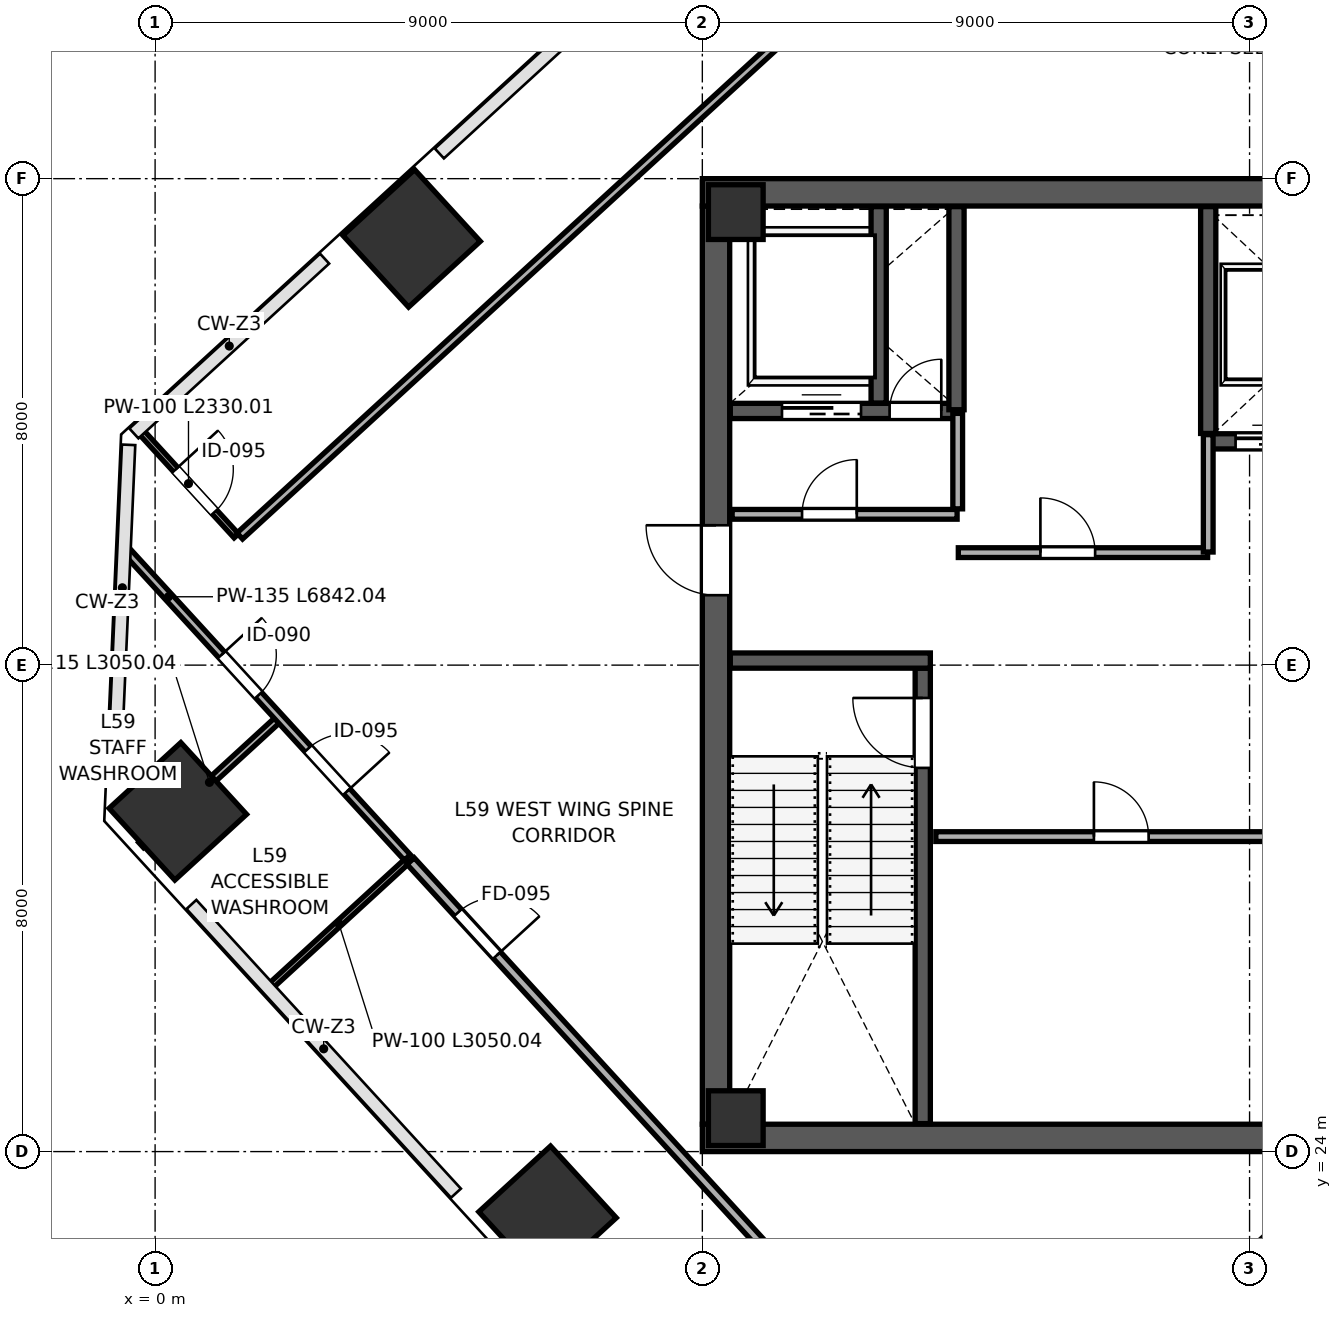
"""IFC4 building model, lengths in metres.
Left out: names, types, materials, properties, quantities, classifications, styles, units other than length and angle.
Written with IfcOpenShell. Run it as: python <this file> out.ifc"""

import sys

from ifc_helpers import new_model, si_unit, direction, frame, frame_2d, origin, origin_2d, place, context, subcontext, project, spatial, rectangle, extrude, source, transform, mapped, element, fill, save


model = new_model("IFC4")
c1 = context("Model", 3, precision=1e-05, world=origin(), true_north=direction((0.0, 1.0)))
c2 = subcontext(c1, "Body", "Model", "MODEL_VIEW")
j1 = project(units=[si_unit("LENGTHUNIT", "METRE"), si_unit("PLANEANGLEUNIT", "RADIAN")], contexts=[c1])
p1 = place(None, origin())
s1 = spatial("IfcSite", under=j1, at=p1, CompositionType="ELEMENT")
p2 = place(p1, origin())
s2 = spatial("IfcBuilding", under=s1, at=p2, CompositionType="ELEMENT")
p3 = place(p2, frame((0.0, 0.0, 262.6)))
s3 = spatial("IfcBuildingStorey", under=s2, at=p3, CompositionType="ELEMENT", Elevation=262.6)
m1 = source(origin(), c2, "Body", "SweptSolid", [
    extrude(rectangle(XDim=0.9, YDim=0.9, at=origin_2d()), origin(), (0.0, 0.0, 1.0), 4.198),
])
for number, where, z_axis, x_axis in (
    (1, (9.55, 24.55, 0.001), (0.0, 0.0, 1.0), (1.0, 0.0, 0.0)),
    (2, (9.55, 39.45, 0.001), (0.0, 0.0, 1.0), (1.0, 0.0, 0.0)),
):
    element("IfcColumn", number, at=place(p3, frame(where, z_axis=z_axis, x_axis=x_axis)), inside=s3, PredefinedType="COLUMN", context=c2, shape_type="MappedRepresentation", body=[
        mapped(m1, transform((0.0, 0.0, 0.0), scale=1.0)),
    ])
m2 = source(origin(), c2, "Body", "SweptSolid", [
    extrude(rectangle(XDim=1.6, YDim=1.6, at=origin_2d()), origin(), (0.0, 0.0, 1.0), 4.198),
])
for number, where, z_axis, x_axis in (
    (3, (0.374, 29.596, 0.001), (0.0, 0.0, 1.0), (-0.676, 0.737, 0.0)),
    (4, (6.454, 22.96, 0.001), (0.0, 0.0, 1.0), (-0.676, 0.737, 0.0)),
    (5, (4.218, 39.018, 0.001), (0.0, 0.0, 1.0), (-0.676, 0.737, 0.0)),
):
    element("IfcColumn", number, at=place(p3, frame(where, z_axis=z_axis, x_axis=x_axis)), inside=s3, PredefinedType="COLUMN", context=c2, shape_type="MappedRepresentation", body=[
        mapped(m2, transform((0.0, 0.0, 0.0), scale=1.0)),
    ])
p4 = place(p3, frame((9.225, 24.45, 0.0), z_axis=(0.0, 0.0, 1.0), x_axis=(0.0, 1.0, 0.0)))
e6 = element("IfcWall", 6, at=p4, inside=s3, PredefinedType="SHEAR", context=c2, shape_type="SweptSolid", body=[
    extrude(rectangle(XDim=15.1, YDim=0.45, at=frame_2d((7.55, 0.0))), origin(), (0.0, 0.0, 1.0), 3.96),
])
p5 = place(p4, frame((8.7, 0.0, 0.0)))
e7 = element("IfcOpeningElement", 7, at=p5, cuts=e6, PredefinedType="OPENING", context=c2, shape_type="SweptSolid", body=[
    extrude(rectangle(XDim=1.15, YDim=2.2, at=frame_2d((0.575, 1.1))), frame((0.0, 0.235, 0.0), z_axis=(0.0, -1.0, 0.0), x_axis=(1.0, 0.0, 0.0)), (0.0, 0.0, 1.0), 0.47),
])
for number, where, z_axis, x_axis in (
    (8, (9.0, 24.225, 0.0), (0.0, 0.0, 1.0), (1.0, 0.0, 0.0)),
    (9, (9.0, 39.775, 0.0), (0.0, 0.0, 1.0), (1.0, 0.0, 0.0)),
):
    element("IfcWall", number, at=place(p3, frame(where, z_axis=z_axis, x_axis=x_axis)), inside=s3, PredefinedType="SHEAR", context=c2, shape_type="SweptSolid", body=[
        extrude(rectangle(XDim=18.0, YDim=0.45, at=frame_2d((9.0, 0.0))), origin(), (0.0, 0.0, 1.0), 3.96),
    ])
p6 = place(p3, frame((12.625, 24.46, 0.0), z_axis=(0.0, 0.0, 1.0), x_axis=(0.0, 1.0, 0.0)))
e10 = element("IfcWall", 10, at=p6, inside=s3, PredefinedType="SHEAR", context=c2, shape_type="SweptSolid", body=[
    extrude(rectangle(XDim=7.49, YDim=0.25, at=frame_2d((3.745, 0.0))), origin(), (0.0, 0.0, 1.0), 3.96),
])
p7 = place(p6, frame((5.85, 0.0, 0.0)))
e11 = element("IfcOpeningElement", 11, at=p7, cuts=e10, PredefinedType="OPENING", context=c2, shape_type="SweptSolid", body=[
    extrude(rectangle(XDim=1.15, YDim=2.2, at=frame_2d((0.575, 1.1))), frame((0.0, 0.135, 0.0), z_axis=(0.0, -1.0, 0.0), x_axis=(1.0, 0.0, 0.0)), (0.0, 0.0, 1.0), 0.27),
])
p8 = place(p3, frame((9.46, 32.075, 0.0), z_axis=(0.0, 0.0, 1.0), x_axis=(1.0, 0.0, 0.0)))
e12 = element("IfcWall", 12, at=p8, inside=s3, PredefinedType="SHEAR", context=c2, shape_type="SweptSolid", body=[
    extrude(rectangle(XDim=3.29, YDim=0.25, at=frame_2d((1.645, 0.0))), origin(), (0.0, 0.0, 1.0), 3.96),
])
p9 = place(p3, frame((9.46, 36.18, 0.0), z_axis=(0.0, 0.0, 1.0), x_axis=(1.0, 0.0, 0.0)))
e13 = element("IfcWall", 13, at=p9, inside=s3, PredefinedType="SHEAR", context=c2, shape_type="SweptSolid", body=[
    extrude(rectangle(XDim=3.79, YDim=0.25, at=frame_2d((1.895, 0.0))), origin(), (0.0, 0.0, 1.0), 3.96),
])
p10 = place(p9, frame((2.62, 0.0, 0.0)))
e14 = element("IfcOpeningElement", 14, at=p10, cuts=e13, PredefinedType="OPENING", context=c2, shape_type="SweptSolid", body=[
    extrude(rectangle(XDim=0.85, YDim=2.1, at=frame_2d((0.425, 1.05))), frame((0.0, 0.135, 0.0), z_axis=(0.0, -1.0, 0.0), x_axis=(1.0, 0.0, 0.0)), (0.0, 0.0, 1.0), 0.27),
])
p11 = place(p9, frame((0.85, 0.0, 0.0)))
e15 = element("IfcOpeningElement", 15, at=p11, cuts=e13, PredefinedType="OPENING", context=c2, shape_type="SweptSolid", body=[
    extrude(rectangle(XDim=1.3, YDim=2.25, at=frame_2d((0.65, 1.125))), frame((0.0, 0.135, 0.0), z_axis=(0.0, -1.0, 0.0), x_axis=(1.0, 0.0, 0.0)), (0.0, 0.0, 1.0), 0.27),
])
p12 = place(p3, frame((11.9, 36.31, 0.0), z_axis=(0.0, 0.0, 1.0), x_axis=(0.0, 1.0, 0.0)))
e16 = element("IfcWall", 16, at=p12, inside=s3, PredefinedType="SHEAR", context=c2, shape_type="SweptSolid", body=[
    extrude(rectangle(XDim=3.23, YDim=0.25, at=frame_2d((1.615, 0.0))), origin(), (0.0, 0.0, 1.0), 3.96),
])
p13 = place(p3, frame((13.18, 36.2, 0.0), z_axis=(0.0, 0.0, 1.0), x_axis=(0.0, 1.0, 0.0)))
e17 = element("IfcWall", 17, at=p13, inside=s3, PredefinedType="SHEAR", context=c2, shape_type="SweptSolid", body=[
    extrude(rectangle(XDim=3.34, YDim=0.25, at=frame_2d((1.67, 0.0))), origin(), (0.0, 0.0, 1.0), 3.96),
])
p14 = place(p3, frame((17.32, 35.68, 0.0), z_axis=(0.0, 0.0, 1.0), x_axis=(1.0, 0.0, 0.0)))
e18 = element("IfcWall", 18, at=p14, inside=s3, PredefinedType="SHEAR", context=c2, shape_type="SweptSolid", body=[
    extrude(rectangle(XDim=3.87, YDim=0.25, at=frame_2d((1.935, 0.0))), origin(), (0.0, 0.0, 1.0), 3.96),
])
p15 = place(p14, frame((0.45, 0.0, 0.0)))
e19 = element("IfcOpeningElement", 19, at=p15, cuts=e18, PredefinedType="OPENING", context=c2, shape_type="SweptSolid", body=[
    extrude(rectangle(XDim=1.1, YDim=2.2, at=frame_2d((0.55, 1.1))), frame((0.0, 0.135, 0.0), z_axis=(0.0, -1.0, 0.0), x_axis=(1.0, 0.0, 0.0)), (0.0, 0.0, 1.0), 0.27),
])
p16 = place(p14, frame((2.35, 0.0, 0.0)))
e20 = element("IfcOpeningElement", 20, at=p16, cuts=e18, PredefinedType="OPENING", context=c2, shape_type="SweptSolid", body=[
    extrude(rectangle(XDim=1.1, YDim=2.2, at=frame_2d((0.55, 1.1))), frame((0.0, 0.135, 0.0), z_axis=(0.0, -1.0, 0.0), x_axis=(1.0, 0.0, 0.0)), (0.0, 0.0, 1.0), 0.27),
])
p17 = place(p3, frame((17.32, 35.81, 0.0), z_axis=(0.0, 0.0, 1.0), x_axis=(0.0, 1.0, 0.0)))
e21 = element("IfcWall", 21, at=p17, inside=s3, PredefinedType="SHEAR", context=c2, shape_type="SweptSolid", body=[
    extrude(rectangle(XDim=3.73, YDim=0.25, at=frame_2d((1.865, 0.0))), origin(), (0.0, 0.0, 1.0), 3.96),
])
p18 = place(p3, frame((9.49, 34.48, 0.0), z_axis=(0.0, 0.0, 1.0), x_axis=(1.0, 0.0, 0.0)))
e22 = element("IfcWall", 22, at=p18, inside=s3, PredefinedType="PARTITIONING", context=c2, shape_type="SweptSolid", body=[
    extrude(rectangle(XDim=3.7, YDim=0.16, at=frame_2d((1.85, 0.0))), origin(), (0.0, 0.0, 1.0), 3.96),
])
p19 = place(p18, frame((1.15, 0.0, 0.0)))
e23 = element("IfcOpeningElement", 23, at=p19, cuts=e22, PredefinedType="OPENING", context=c2, shape_type="SweptSolid", body=[
    extrude(rectangle(XDim=0.9, YDim=2.15, at=frame_2d((0.45, 1.075))), frame((0.0, 0.09, 0.0), z_axis=(0.0, -1.0, 0.0), x_axis=(1.0, 0.0, 0.0)), (0.0, 0.0, 1.0), 0.18),
])
p20 = place(p3, frame((13.2, 34.57, 0.0), z_axis=(0.0, 0.0, 1.0), x_axis=(0.0, 1.0, 0.0)))
e24 = element("IfcWall", 24, at=p20, inside=s3, PredefinedType="PARTITIONING", context=c2, shape_type="SweptSolid", body=[
    extrude(rectangle(XDim=1.57, YDim=0.16, at=frame_2d((0.785, 0.0))), origin(), (0.0, 0.0, 1.0), 3.96),
])
p21 = place(p3, frame((13.21, 33.85, 0.0), z_axis=(0.0, 0.0, 1.0), x_axis=(1.0, 0.0, 0.0)))
e25 = element("IfcWall", 25, at=p21, inside=s3, PredefinedType="PARTITIONING", context=c2, shape_type="SweptSolid", body=[
    extrude(rectangle(XDim=4.1, YDim=0.16, at=frame_2d((2.05, 0.0))), origin(), (0.0, 0.0, 1.0), 3.96),
])
p22 = place(p21, frame((1.35, 0.0, 0.0)))
e26 = element("IfcOpeningElement", 26, at=p22, cuts=e25, PredefinedType="OPENING", context=c2, shape_type="SweptSolid", body=[
    extrude(rectangle(XDim=0.9, YDim=2.15, at=frame_2d((0.45, 1.075))), frame((0.0, 0.09, 0.0), z_axis=(0.0, -1.0, 0.0), x_axis=(1.0, 0.0, 0.0)), (0.0, 0.0, 1.0), 0.18),
])
p23 = place(p3, frame((17.32, 33.86, 0.0), z_axis=(0.0, 0.0, 1.0), x_axis=(0.0, 1.0, 0.0)))
e27 = element("IfcWall", 27, at=p23, inside=s3, PredefinedType="PARTITIONING", context=c2, shape_type="SweptSolid", body=[
    extrude(rectangle(XDim=1.93, YDim=0.16, at=frame_2d((0.965, 0.0))), origin(), (0.0, 0.0, 1.0), 3.96),
])
p24 = place(p3, frame((12.84, 29.18, 0.0), z_axis=(0.0, 0.0, 1.0), x_axis=(1.0, 0.0, 0.0)))
e28 = element("IfcWall", 28, at=p24, inside=s3, PredefinedType="PARTITIONING", context=c2, shape_type="SweptSolid", body=[
    extrude(rectangle(XDim=8.37, YDim=0.16, at=frame_2d((4.185, 0.0))), origin(), (0.0, 0.0, 1.0), 3.96),
])
p25 = place(p24, frame((2.6, 0.0, 0.0)))
e29 = element("IfcOpeningElement", 29, at=p25, cuts=e28, PredefinedType="OPENING", context=c2, shape_type="SweptSolid", body=[
    extrude(rectangle(XDim=0.9, YDim=2.15, at=frame_2d((0.45, 1.075))), frame((0.0, 0.09, 0.0), z_axis=(0.0, -1.0, 0.0), x_axis=(1.0, 0.0, 0.0)), (0.0, 0.0, 1.0), 0.18),
])
p26 = place(p3, frame((-0.231, 29.042, 0.0), z_axis=(0.0, 0.0, 1.0), x_axis=(0.737290351983, 0.675576003772, 0.0)))
e30 = element("IfcWall", 30, at=p26, inside=s3, PredefinedType="PARTITIONING", context=c2, shape_type="SweptSolid", body=[
    extrude(rectangle(XDim=3.05, YDim=0.115, at=frame_2d((1.525, 0.0))), origin(), (0.0, 0.0, 1.0), 3.295),
])
p27 = place(p3, frame((1.897, 26.719, 0.0), z_axis=(0.0, 0.0, 1.0), x_axis=(0.737290351983, 0.675576003772, 0.0)))
e31 = element("IfcWall", 31, at=p27, inside=s3, PredefinedType="PARTITIONING", context=c2, shape_type="SweptSolid", body=[
    extrude(rectangle(XDim=3.05, YDim=0.1, at=frame_2d((1.525, 0.0))), origin(), (0.0, 0.0, 1.0), 3.295),
])
p28 = place(p3, frame((-0.474, 33.881, 0.0), z_axis=(0.0, 0.0, 1.0), x_axis=(0.675605050901, -0.73726373517, 0.0)))
e32 = element("IfcWall", 32, at=p28, inside=s3, PredefinedType="PARTITIONING", context=c2, shape_type="SweptSolid", body=[
    extrude(rectangle(XDim=6.842, YDim=0.135, at=frame_2d((3.421, 0.0))), origin(), (0.0, 0.0, 1.0), 3.96),
])
p29 = place(p28, frame((2.32, 0.0, 0.0)))
e33 = element("IfcOpeningElement", 33, at=p29, cuts=e32, PredefinedType="OPENING", context=c2, shape_type="SweptSolid", body=[
    extrude(rectangle(XDim=0.9, YDim=2.15, at=frame_2d((0.45, 1.075))), frame((0.0, 0.078, 0.0), z_axis=(0.0, -1.0, 0.0), x_axis=(1.0, 0.0, 0.0)), (0.0, 0.0, 1.0), 0.155),
])
p30 = place(p28, frame((4.42, 0.0, 0.0)))
e34 = element("IfcOpeningElement", 34, at=p30, cuts=e32, PredefinedType="OPENING", context=c2, shape_type="SweptSolid", body=[
    extrude(rectangle(XDim=0.95, YDim=2.15, at=frame_2d((0.475, 1.075))), frame((0.0, 0.078, 0.0), z_axis=(0.0, -1.0, 0.0), x_axis=(1.0, 0.0, 0.0)), (0.0, 0.0, 1.0), 0.155),
])
p31 = place(p3, frame((4.203, 28.778, 0.0), z_axis=(0.0, 0.0, 1.0), x_axis=(0.675591041558, -0.737276572642, 0.0)))
e35 = element("IfcWall", 35, at=p31, inside=s3, PredefinedType="PARTITIONING", context=c2, shape_type="SweptSolid", body=[
    extrude(rectangle(XDim=14.07, YDim=0.16, at=frame_2d((7.035, 0.0))), origin(), (0.0, 0.0, 1.0), 3.96),
])
p32 = place(p31, frame((1.15, 0.0, 0.0)))
e36 = element("IfcOpeningElement", 36, at=p32, cuts=e35, PredefinedType="OPENING", context=c2, shape_type="SweptSolid", body=[
    extrude(rectangle(XDim=0.95, YDim=2.15, at=frame_2d((0.475, 1.075))), frame((0.0, 0.09, 0.0), z_axis=(0.0, -1.0, 0.0), x_axis=(1.0, 0.0, 0.0)), (0.0, 0.0, 1.0), 0.18),
])
p33 = place(p3, frame((13.765, 18.402, 0.0), z_axis=(0.0, 0.0, 1.0), x_axis=(0.737266340408, 0.675602207887, 0.0)))
e37 = element("IfcWall", 37, at=p33, inside=s3, PredefinedType="PARTITIONING", context=c2, shape_type="SweptSolid", body=[
    extrude(rectangle(XDim=8.128, YDim=0.16, at=frame_2d((4.064, 0.0))), origin(), (0.0, 0.0, 1.0), 3.96),
])
p34 = place(p3, frame((-0.238, 35.844, 0.0), z_axis=(0.0, 0.0, 1.0), x_axis=(0.67562972666, -0.737241122329, 0.0)))
e38 = element("IfcWall", 38, at=p34, inside=s3, PredefinedType="PARTITIONING", context=c2, shape_type="SweptSolid", body=[
    extrude(rectangle(XDim=2.33, YDim=0.1, at=frame_2d((1.165, 0.0))), origin(), (0.0, 0.0, 1.0), 3.96),
])
p35 = place(p34, frame((0.85, 0.0, 0.0)))
e39 = element("IfcOpeningElement", 39, at=p35, cuts=e38, PredefinedType="OPENING", context=c2, shape_type="SweptSolid", body=[
    extrude(rectangle(XDim=0.95, YDim=2.15, at=frame_2d((0.475, 1.075))), frame((0.0, 0.06, 0.0), z_axis=(0.0, -1.0, 0.0), x_axis=(1.0, 0.0, 0.0)), (0.0, 0.0, 1.0), 0.12),
])
p36 = place(p3, frame((1.393, 34.124, 0.0), z_axis=(0.0, 0.0, 1.0), x_axis=(0.737274323436, 0.675593496121, 0.0)))
e40 = element("IfcWall", 40, at=p36, inside=s3, PredefinedType="PARTITIONING", context=c2, shape_type="SweptSolid", body=[
    extrude(rectangle(XDim=27.402, YDim=0.135, at=frame_2d((13.701, 0.0))), origin(), (0.0, 0.0, 1.0), 3.96),
])
p37 = place(p3, frame((12.47, 15.181, 0.0), z_axis=(0.0, 0.0, 1.0), x_axis=(0.737265724175, 0.675602880365, 0.0)))
e41 = element("IfcWall", 41, at=p37, inside=s3, PredefinedType="PARTITIONING", context=c2, shape_type="SweptSolid", body=[
    extrude(rectangle(XDim=12.895, YDim=0.16, at=frame_2d((6.448, 0.0))), origin(), (0.0, 0.0, 1.0), 3.96),
])
m3 = source(origin(), c2, "Body", "SweptSolid", [
    extrude(rectangle(XDim=1.15, YDim=2.2, at=frame_2d((0.575, 1.1))), frame((0.0, 0.025, 0.0), z_axis=(0.0, -1.0, 0.0), x_axis=(1.0, 0.0, 0.0)), (0.0, 0.0, 1.0), 0.05),
])
p38 = place(p7, origin())
e42 = element("IfcDoor", 42, at=p38, inside=s3, OperationType="SINGLE_SWING_RIGHT", PredefinedType="DOOR", context=c2, shape_type="MappedRepresentation", body=[
    mapped(m3, transform((0.0, 0.0, 0.0), scale=1.0)),
])
fill(e11, e42)
m4 = source(origin(), c2, "Body", "SweptSolid", [
    extrude(rectangle(XDim=1.15, YDim=2.2, at=frame_2d((0.575, 1.1))), frame((0.0, 0.025, 0.0), z_axis=(0.0, -1.0, 0.0), x_axis=(1.0, 0.0, 0.0)), (0.0, 0.0, 1.0), 0.05),
])
p39 = place(p5, origin())
e43 = element("IfcDoor", 43, at=p39, inside=s3, OperationType="SINGLE_SWING_RIGHT", PredefinedType="DOOR", context=c2, shape_type="MappedRepresentation", body=[
    mapped(m4, transform((0.0, 0.0, 0.0), scale=1.0)),
])
fill(e7, e43)
m5 = source(origin(), c2, "Body", "SweptSolid", [
    extrude(rectangle(XDim=0.85, YDim=2.1, at=frame_2d((0.425, 1.05))), frame((0.0, 0.025, 0.0), z_axis=(0.0, -1.0, 0.0), x_axis=(1.0, 0.0, 0.0)), (0.0, 0.0, 1.0), 0.05),
])
p40 = place(p10, origin())
e44 = element("IfcDoor", 44, at=p40, inside=s3, OperationType="SINGLE_SWING_RIGHT", PredefinedType="DOOR", context=c2, shape_type="MappedRepresentation", body=[
    mapped(m5, transform((0.0, 0.0, 0.0), scale=1.0)),
])
fill(e14, e44)
m6 = source(origin(), c2, "Body", "SweptSolid", [
    extrude(rectangle(XDim=1.1, YDim=2.2, at=frame_2d((0.55, 1.1))), frame((0.0, 0.025, 0.0), z_axis=(0.0, -1.0, 0.0), x_axis=(1.0, 0.0, 0.0)), (0.0, 0.0, 1.0), 0.05),
])
p41 = place(p15, origin())
e45 = element("IfcDoor", 45, at=p41, inside=s3, OperationType="SLIDING_TO_LEFT", PredefinedType="DOOR", context=c2, shape_type="MappedRepresentation", body=[
    mapped(m6, transform((0.0, 0.0, 0.0), scale=1.0)),
])
fill(e19, e45)
m7 = source(origin(), c2, "Body", "SweptSolid", [
    extrude(rectangle(XDim=1.3, YDim=2.25, at=frame_2d((0.65, 1.125))), frame((0.0, 0.025, 0.0), z_axis=(0.0, -1.0, 0.0), x_axis=(1.0, 0.0, 0.0)), (0.0, 0.0, 1.0), 0.05),
])
p42 = place(p11, origin())
e46 = element("IfcDoor", 46, at=p42, inside=s3, OperationType="SLIDING_TO_LEFT", PredefinedType="DOOR", context=c2, shape_type="MappedRepresentation", body=[
    mapped(m7, transform((0.0, 0.0, 0.0), scale=1.0)),
])
fill(e15, e46)
m8 = source(origin(), c2, "Body", "SweptSolid", [
    extrude(rectangle(XDim=0.9, YDim=2.15, at=frame_2d((0.45, 1.075))), frame((0.0, 0.025, 0.0), z_axis=(0.0, -1.0, 0.0), x_axis=(1.0, 0.0, 0.0)), (0.0, 0.0, 1.0), 0.05),
])
p43 = place(p19, origin())
e47 = element("IfcDoor", 47, at=p43, inside=s3, OperationType="SINGLE_SWING_RIGHT", PredefinedType="DOOR", context=c2, shape_type="MappedRepresentation", body=[
    mapped(m8, transform((0.0, 0.0, 0.0), scale=1.0)),
])
fill(e23, e47)
p44 = place(p22, origin())
e48 = element("IfcDoor", 48, at=p44, inside=s3, OperationType="SINGLE_SWING_LEFT", PredefinedType="DOOR", context=c2, shape_type="MappedRepresentation", body=[
    mapped(m8, transform((0.0, 0.0, 0.0), scale=1.0)),
])
fill(e26, e48)
p45 = place(p25, origin())
e49 = element("IfcDoor", 49, at=p45, inside=s3, OperationType="SINGLE_SWING_LEFT", PredefinedType="DOOR", context=c2, shape_type="MappedRepresentation", body=[
    mapped(m8, transform((0.0, 0.0, 0.0), scale=1.0)),
])
fill(e29, e49)
m9 = source(origin(), c2, "Body", "SweptSolid", [
    extrude(rectangle(XDim=0.9, YDim=2.15, at=frame_2d((0.45, 1.075))), frame((0.0, 0.025, 0.0), z_axis=(0.0, -1.0, 0.0), x_axis=(1.0, 0.0, 0.0)), (0.0, 0.0, 1.0), 0.05),
])
p46 = place(p29, origin())
e50 = element("IfcDoor", 50, at=p46, inside=s3, OperationType="SINGLE_SWING_LEFT", PredefinedType="DOOR", context=c2, shape_type="MappedRepresentation", body=[
    mapped(m9, transform((0.0, 0.0, 0.0), scale=1.0)),
])
fill(e33, e50)
m10 = source(origin(), c2, "Body", "SweptSolid", [
    extrude(rectangle(XDim=0.95, YDim=2.15, at=frame_2d((0.475, 1.075))), frame((0.0, 0.025, 0.0), z_axis=(0.0, -1.0, 0.0), x_axis=(1.0, 0.0, 0.0)), (0.0, 0.0, 1.0), 0.05),
])
p47 = place(p30, origin())
e51 = element("IfcDoor", 51, at=p47, inside=s3, OperationType="SINGLE_SWING_RIGHT", PredefinedType="DOOR", context=c2, shape_type="MappedRepresentation", body=[
    mapped(m10, transform((0.0, 0.0, 0.0), scale=1.0)),
])
fill(e34, e51)
m11 = source(origin(), c2, "Body", "SweptSolid", [
    extrude(rectangle(XDim=0.95, YDim=2.15, at=frame_2d((0.475, 1.075))), frame((0.0, 0.025, 0.0), z_axis=(0.0, -1.0, 0.0), x_axis=(1.0, 0.0, 0.0)), (0.0, 0.0, 1.0), 0.05),
])
p48 = place(p32, origin())
e52 = element("IfcDoor", 52, at=p48, inside=s3, OperationType="SINGLE_SWING_RIGHT", PredefinedType="DOOR", context=c2, shape_type="MappedRepresentation", body=[
    mapped(m11, transform((0.0, 0.0, 0.0), scale=1.0)),
])
fill(e36, e52)
p49 = place(p35, origin())
e53 = element("IfcDoor", 53, at=p49, inside=s3, OperationType="SINGLE_SWING_LEFT", PredefinedType="DOOR", context=c2, shape_type="MappedRepresentation", body=[
    mapped(m10, transform((0.0, 0.0, 0.0), scale=1.0)),
])
fill(e39, e53)
save(model, sys.argv[1])
